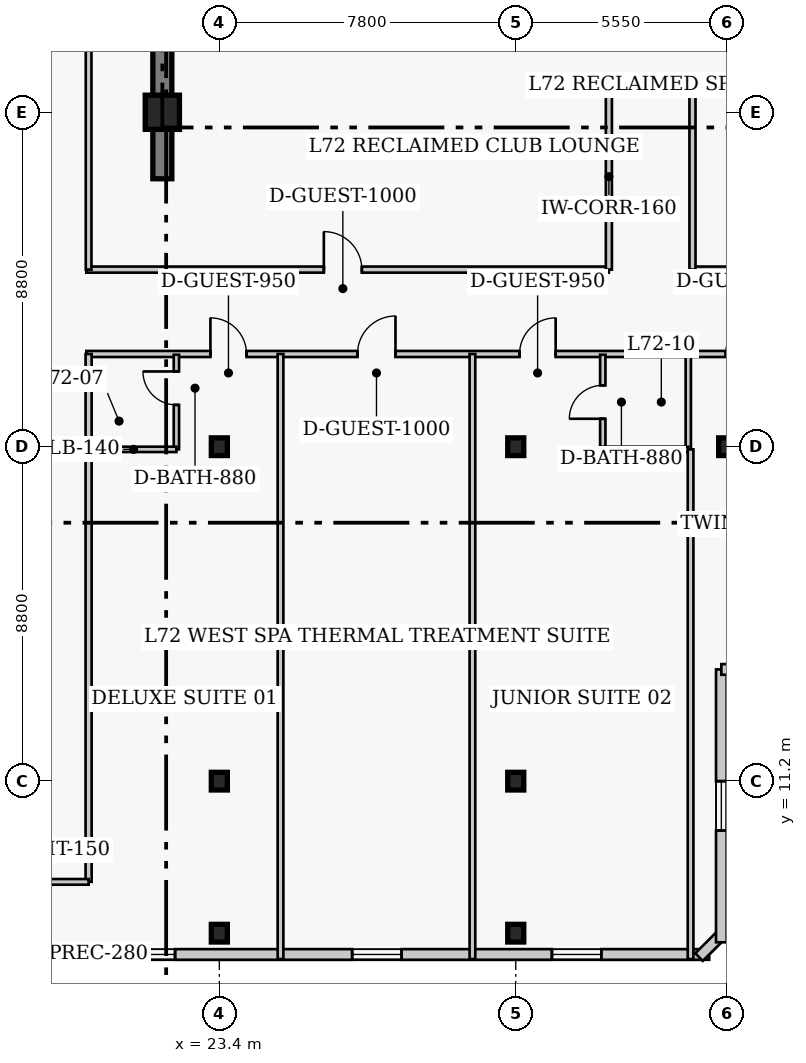
"""IFC4 building model, lengths in metres.
Left out: names, types, materials, properties, quantities, classifications, styles, units other than length and angle.
Written with IfcOpenShell. Run it as: python <this file> out.ifc"""

import sys

from ifc_helpers import new_model, si_unit, direction, frame, frame_2d, origin, origin_2d, place, context, subcontext, project, spatial, rectangle, i_section, extrude, element, fill, save


model = new_model("IFC4")
c1 = context("Model", 3, precision=1e-05, world=origin(), true_north=direction((0.0, 1.0)))
c2 = subcontext(c1, "Body", "Model", "MODEL_VIEW")
j1 = project(units=[si_unit("LENGTHUNIT", "METRE"), si_unit("PLANEANGLEUNIT", "RADIAN")], contexts=[c1])
p1 = place(None, origin())
s1 = spatial("IfcSite", under=j1, at=p1, CompositionType="ELEMENT")
p2 = place(p1, origin())
s2 = spatial("IfcBuilding", under=s1, at=p2, CompositionType="ELEMENT")
p3 = place(p2, frame((0.0, 0.0, 289.4)))
s3 = spatial("IfcBuildingStorey", under=s2, at=p3, CompositionType="ELEMENT", Elevation=289.4)
p4 = place(p3, frame((21.9, 27.05, 0.0), z_axis=(0.0, 0.0, 1.0), x_axis=(0.0, 1.0, 0.0)))
e1 = element("IfcWall", 1, at=p4, inside=s3, PredefinedType="SHEAR", context=c2, shape_type="SweptSolid", body=[
    extrude(rectangle(XDim=13.52, YDim=0.5, at=frame_2d((6.76, 0.0))), origin(), (0.0, 0.0, 1.0), 4.0),
])
for number, where, z_axis, x_axis in (
    (2, (23.4, 11.2, 0.0), (0.0, 0.0, 1.0), (1.0, 0.0, 0.0)),
    (3, (23.4, 20.0, 0.0), (0.0, 0.0, 1.0), (1.0, 0.0, 0.0)),
    (4, (31.2, 11.2, 0.0), (0.0, 0.0, 1.0), (1.0, 0.0, 0.0)),
    (5, (31.2, 20.0, 0.0), (0.0, 0.0, 1.0), (1.0, 0.0, 0.0)),
    (6, (36.75, 20.0, 0.0), (0.0, 0.0, 1.0), (1.0, 0.0, 0.0)),
):
    element("IfcColumn", number, at=place(p3, frame(where, z_axis=z_axis, x_axis=x_axis)), inside=s3, PredefinedType="COLUMN", context=c2, shape_type="SweptSolid", body=[
        extrude(i_section(OverallWidth=0.422, OverallDepth=0.465, WebThickness=0.045, FlangeThickness=0.073, FilletRadius=0.017, at=origin_2d()), origin(), (0.0, 0.0, 1.0), 4.0),
    ])
p5 = place(p3, frame((21.9, 28.8, 0.0), z_axis=(0.0, 0.0, 1.0), x_axis=(1.0, 0.0, 0.0)))
e7 = element("IfcColumn", 7, at=p5, inside=s3, PredefinedType="COLUMN", context=c2, shape_type="SweptSolid", body=[
    extrude(rectangle(XDim=0.9, YDim=0.9, at=origin_2d()), origin(), (0.0, 0.0, 1.0), 4.0),
])
for number, where, z_axis, x_axis in (
    (8, (23.4, 7.2, 0.0), (0.0, 0.0, 1.0), (1.0, 0.0, 0.0)),
    (9, (31.2, 7.2, 0.0), (0.0, 0.0, 1.0), (1.0, 0.0, 0.0)),
):
    element("IfcColumn", number, at=place(p3, frame(where, z_axis=z_axis, x_axis=x_axis)), inside=s3, PredefinedType="COLUMN", context=c2, shape_type="SweptSolid", body=[
        extrude(i_section(OverallWidth=0.422, OverallDepth=0.465, WebThickness=0.045, FlangeThickness=0.073, FilletRadius=0.017, at=origin_2d()), origin(), (0.0, 0.0, 1.0), 4.0),
    ])
p6 = place(p3, frame((11.46, 6.64, 0.0), z_axis=(0.0, 0.0, 1.0), x_axis=(1.0, 0.0, 0.0)))
e10 = element("IfcWall", 10, at=p6, inside=s3, PredefinedType="SOLIDWALL", context=c2, shape_type="SweptSolid", body=[
    extrude(rectangle(XDim=24.83, YDim=0.28, at=frame_2d((12.415, 0.0))), origin(), (0.0, 0.0, 1.0), 3.76),
])
p7 = place(p6, frame((3.488, 0.0, 0.85)))
e11 = element("IfcOpeningElement", 11, at=p7, cuts=e10, PredefinedType="OPENING", context=c2, shape_type="SweptSolid", body=[
    extrude(rectangle(XDim=1.3, YDim=1.7, at=frame_2d((0.65, 0.85))), frame((0.0, 0.15, 0.0), z_axis=(0.0, -1.0, 0.0), x_axis=(1.0, 0.0, 0.0)), (0.0, 0.0, 1.0), 0.3),
])
p8 = place(p6, frame((20.692, 0.0, 0.85)))
e12 = element("IfcOpeningElement", 12, at=p8, cuts=e10, PredefinedType="OPENING", context=c2, shape_type="SweptSolid", body=[
    extrude(rectangle(XDim=1.3, YDim=1.7, at=frame_2d((0.65, 0.85))), frame((0.0, 0.15, 0.0), z_axis=(0.0, -1.0, 0.0), x_axis=(1.0, 0.0, 0.0)), (0.0, 0.0, 1.0), 0.3),
])
p9 = place(p6, frame((9.475, 0.0, 0.85)))
e13 = element("IfcOpeningElement", 13, at=p9, cuts=e10, PredefinedType="OPENING", context=c2, shape_type="SweptSolid", body=[
    extrude(rectangle(XDim=1.3, YDim=1.7, at=frame_2d((0.65, 0.85))), frame((0.0, 0.15, 0.0), z_axis=(0.0, -1.0, 0.0), x_axis=(1.0, 0.0, 0.0)), (0.0, 0.0, 1.0), 0.3),
])
p10 = place(p6, frame((15.435, 0.0, 0.85)))
e14 = element("IfcOpeningElement", 14, at=p10, cuts=e10, PredefinedType="OPENING", context=c2, shape_type="SweptSolid", body=[
    extrude(rectangle(XDim=1.3, YDim=1.7, at=frame_2d((0.65, 0.85))), frame((0.0, 0.15, 0.0), z_axis=(0.0, -1.0, 0.0), x_axis=(1.0, 0.0, 0.0)), (0.0, 0.0, 1.0), 0.3),
])
p11 = place(p3, frame((36.023, 6.571, 0.0), z_axis=(0.0, 0.0, 1.0), x_axis=(0.707106781187, 0.707106781187, 0.0)))
e15 = element("IfcWall", 15, at=p11, inside=s3, PredefinedType="SOLIDWALL", context=c2, shape_type="SweptSolid", body=[
    extrude(rectangle(XDim=0.928, YDim=0.28, at=frame_2d((0.464, 0.0))), origin(), (0.0, 0.0, 1.0), 3.76),
])
p12 = place(p3, frame((36.61, 6.96, 0.0), z_axis=(0.0, 0.0, 1.0), x_axis=(0.0, 1.0, 0.0)))
e16 = element("IfcWall", 16, at=p12, inside=s3, PredefinedType="SOLIDWALL", context=c2, shape_type="SweptSolid", body=[
    extrude(rectangle(XDim=7.18, YDim=0.28, at=frame_2d((3.59, 0.0))), origin(), (0.0, 0.0, 1.0), 3.76),
])
p13 = place(p12, frame((2.94, 0.0, 0.85)))
e17 = element("IfcOpeningElement", 17, at=p13, cuts=e16, PredefinedType="OPENING", context=c2, shape_type="SweptSolid", body=[
    extrude(rectangle(XDim=1.3, YDim=1.7, at=frame_2d((0.65, 0.85))), frame((0.0, 0.15, 0.0), z_axis=(0.0, -1.0, 0.0), x_axis=(1.0, 0.0, 0.0)), (0.0, 0.0, 1.0), 0.3),
])
p14 = place(p3, frame((36.61, 14.14, 0.0), z_axis=(0.0, 0.0, 1.0), x_axis=(1.0, 0.0, 0.0)))
e18 = element("IfcWall", 18, at=p14, inside=s3, PredefinedType="SOLIDWALL", context=c2, shape_type="SweptSolid", body=[
    extrude(rectangle(XDim=4.78, YDim=0.28, at=frame_2d((2.39, 0.0))), origin(), (0.0, 0.0, 1.0), 3.76),
])
p15 = place(p14, frame((1.74, 0.0, 0.85)))
e19 = element("IfcOpeningElement", 19, at=p15, cuts=e18, PredefinedType="OPENING", context=c2, shape_type="SweptSolid", body=[
    extrude(rectangle(XDim=1.3, YDim=1.7, at=frame_2d((0.65, 0.85))), frame((0.0, 0.15, 0.0), z_axis=(0.0, -1.0, 0.0), x_axis=(1.0, 0.0, 0.0)), (0.0, 0.0, 1.0), 0.3),
])
p16 = place(p3, frame((19.9, 24.66, 0.0), z_axis=(0.0, 0.0, 1.0), x_axis=(1.0, 0.0, 0.0)))
e20 = element("IfcWall", 20, at=p16, inside=s3, PredefinedType="PARTITIONING", context=c2, shape_type="SweptSolid", body=[
    extrude(rectangle(XDim=13.75, YDim=0.16, at=frame_2d((6.875, 0.0))), origin(), (0.0, 0.0, 1.0), 3.76),
])
p17 = place(p16, frame((6.25, 0.0, 0.0)))
e21 = element("IfcOpeningElement", 21, at=p17, cuts=e20, PredefinedType="OPENING", context=c2, shape_type="SweptSolid", body=[
    extrude(rectangle(XDim=1.0, YDim=2.15, at=frame_2d((0.5, 1.075))), frame((0.0, 0.09, 0.0), z_axis=(0.0, -1.0, 0.0), x_axis=(1.0, 0.0, 0.0)), (0.0, 0.0, 1.0), 0.18),
])
p18 = place(p3, frame((35.85, 24.66, 0.0), z_axis=(0.0, 0.0, 1.0), x_axis=(1.0, 0.0, 0.0)))
e22 = element("IfcWall", 22, at=p18, inside=s3, PredefinedType="PARTITIONING", context=c2, shape_type="SweptSolid", body=[
    extrude(rectangle(XDim=22.8, YDim=0.16, at=frame_2d((11.4, 0.0))), origin(), (0.0, 0.0, 1.0), 3.76),
])
p19 = place(p18, frame((5.35, 0.0, 0.0)))
e23 = element("IfcOpeningElement", 23, at=p19, cuts=e22, PredefinedType="OPENING", context=c2, shape_type="SweptSolid", body=[
    extrude(rectangle(XDim=1.0, YDim=2.15, at=frame_2d((0.5, 1.075))), frame((0.0, 0.09, 0.0), z_axis=(0.0, -1.0, 0.0), x_axis=(1.0, 0.0, 0.0)), (0.0, 0.0, 1.0), 0.18),
])
p20 = place(p18, frame((12.85, 0.0, 0.0)))
e24 = element("IfcOpeningElement", 24, at=p20, cuts=e22, PredefinedType="OPENING", context=c2, shape_type="SweptSolid", body=[
    extrude(rectangle(XDim=1.0, YDim=2.15, at=frame_2d((0.5, 1.075))), frame((0.0, 0.09, 0.0), z_axis=(0.0, -1.0, 0.0), x_axis=(1.0, 0.0, 0.0)), (0.0, 0.0, 1.0), 0.18),
])
for number, where, z_axis, x_axis in (
    (25, (33.65, 24.66, 0.0), (0.0, 0.0, 1.0), (0.0, 1.0, 0.0)),
    (26, (35.85, 24.66, 0.0), (0.0, 0.0, 1.0), (0.0, 1.0, 0.0)),
):
    element("IfcWall", number, at=place(p3, frame(where, z_axis=z_axis, x_axis=x_axis)), inside=s3, PredefinedType="PARTITIONING", context=c2, shape_type="SweptSolid", body=[
        extrude(rectangle(XDim=4.89, YDim=0.16, at=frame_2d((2.445, 0.0))), origin(), (0.0, 0.0, 1.0), 3.76),
    ])
p21 = place(p3, frame((19.9, 22.44, 0.0), z_axis=(0.0, 0.0, 1.0), x_axis=(1.0, 0.0, 0.0)))
e27 = element("IfcWall", 27, at=p21, inside=s3, PredefinedType="PARTITIONING", context=c2, shape_type="SweptSolid", body=[
    extrude(rectangle(XDim=15.9, YDim=0.16, at=frame_2d((7.95, 0.0))), origin(), (0.0, 0.0, 1.0), 3.76),
])
p22 = place(p21, frame((3.265, 0.0, 0.0)))
e28 = element("IfcOpeningElement", 28, at=p22, cuts=e27, PredefinedType="OPENING", context=c2, shape_type="SweptSolid", body=[
    extrude(rectangle(XDim=0.95, YDim=2.1, at=frame_2d((0.475, 1.05))), frame((0.0, 0.09, 0.0), z_axis=(0.0, -1.0, 0.0), x_axis=(1.0, 0.0, 0.0)), (0.0, 0.0, 1.0), 0.18),
])
p23 = place(p21, frame((7.135, 0.0, 0.0)))
e29 = element("IfcOpeningElement", 29, at=p23, cuts=e27, PredefinedType="OPENING", context=c2, shape_type="SweptSolid", body=[
    extrude(rectangle(XDim=1.0, YDim=2.15, at=frame_2d((0.5, 1.075))), frame((0.0, 0.09, 0.0), z_axis=(0.0, -1.0, 0.0), x_axis=(1.0, 0.0, 0.0)), (0.0, 0.0, 1.0), 0.18),
])
p24 = place(p21, frame((11.4, 0.0, 0.0)))
e30 = element("IfcOpeningElement", 30, at=p24, cuts=e27, PredefinedType="OPENING", context=c2, shape_type="SweptSolid", body=[
    extrude(rectangle(XDim=0.95, YDim=2.1, at=frame_2d((0.475, 1.05))), frame((0.0, 0.09, 0.0), z_axis=(0.0, -1.0, 0.0), x_axis=(1.0, 0.0, 0.0)), (0.0, 0.0, 1.0), 0.18),
])
p25 = place(p3, frame((35.8, 22.44, 0.0), z_axis=(0.0, 0.0, 1.0), x_axis=(1.0, 0.0, 0.0)))
e31 = element("IfcWall", 31, at=p25, inside=s3, PredefinedType="PARTITIONING", context=c2, shape_type="SweptSolid", body=[
    extrude(rectangle(XDim=25.01, YDim=0.16, at=frame_2d((12.505, 0.0))), origin(), (0.0, 0.0, 1.0), 3.76),
])
p26 = place(p25, frame((0.924, 0.0, 0.0)))
e32 = element("IfcOpeningElement", 32, at=p26, cuts=e31, PredefinedType="OPENING", context=c2, shape_type="SweptSolid", body=[
    extrude(rectangle(XDim=0.95, YDim=2.1, at=frame_2d((0.475, 1.05))), frame((0.0, 0.09, 0.0), z_axis=(0.0, -1.0, 0.0), x_axis=(1.0, 0.0, 0.0)), (0.0, 0.0, 1.0), 0.18),
])
p27 = place(p25, frame((9.226, 0.0, 0.0)))
e33 = element("IfcOpeningElement", 33, at=p27, cuts=e31, PredefinedType="OPENING", context=c2, shape_type="SweptSolid", body=[
    extrude(rectangle(XDim=0.95, YDim=2.1, at=frame_2d((0.475, 1.05))), frame((0.0, 0.09, 0.0), z_axis=(0.0, -1.0, 0.0), x_axis=(1.0, 0.0, 0.0)), (0.0, 0.0, 1.0), 0.18),
])
p28 = place(p25, frame((12.614, 0.0, 0.0)))
e34 = element("IfcOpeningElement", 34, at=p28, cuts=e31, PredefinedType="OPENING", context=c2, shape_type="SweptSolid", body=[
    extrude(rectangle(XDim=0.95, YDim=2.1, at=frame_2d((0.475, 1.05))), frame((0.0, 0.09, 0.0), z_axis=(0.0, -1.0, 0.0), x_axis=(1.0, 0.0, 0.0)), (0.0, 0.0, 1.0), 0.18),
])
p29 = place(p25, frame((19.441, 0.0, 0.0)))
e35 = element("IfcOpeningElement", 35, at=p29, cuts=e31, PredefinedType="OPENING", context=c2, shape_type="SweptSolid", body=[
    extrude(rectangle(XDim=1.0, YDim=2.15, at=frame_2d((0.5, 1.075))), frame((0.0, 0.09, 0.0), z_axis=(0.0, -1.0, 0.0), x_axis=(1.0, 0.0, 0.0)), (0.0, 0.0, 1.0), 0.18),
])
p30 = place(p25, frame((23.465, 0.0, 0.0)))
e36 = element("IfcOpeningElement", 36, at=p30, cuts=e31, PredefinedType="OPENING", context=c2, shape_type="SweptSolid", body=[
    extrude(rectangle(XDim=0.95, YDim=2.1, at=frame_2d((0.475, 1.05))), frame((0.0, 0.09, 0.0), z_axis=(0.0, -1.0, 0.0), x_axis=(1.0, 0.0, 0.0)), (0.0, 0.0, 1.0), 0.18),
])
p31 = place(p3, frame((19.96, 8.55, 0.0), z_axis=(0.0, 0.0, 1.0), x_axis=(0.0, 1.0, 0.0)))
e37 = element("IfcWall", 37, at=p31, inside=s3, PredefinedType="PARTITIONING", context=c2, shape_type="SweptSolid", body=[
    extrude(rectangle(XDim=13.89, YDim=0.16, at=frame_2d((6.945, 0.0))), origin(), (0.0, 0.0, 1.0), 3.76),
])
p32 = place(p3, frame((17.74, 8.55, 0.0), z_axis=(0.0, 0.0, 1.0), x_axis=(1.0, 0.0, 0.0)))
e38 = element("IfcWall", 38, at=p32, inside=s3, PredefinedType="PARTITIONING", context=c2, shape_type="SweptSolid", body=[
    extrude(rectangle(XDim=2.22, YDim=0.15, at=frame_2d((1.11, 0.0))), origin(), (0.0, 0.0, 1.0), 3.76),
])
p33 = place(p3, frame((19.96, 24.66, 0.0), z_axis=(0.0, 0.0, 1.0), x_axis=(0.0, 1.0, 0.0)))
e39 = element("IfcWall", 39, at=p33, inside=s3, PredefinedType="PARTITIONING", context=c2, shape_type="SweptSolid", body=[
    extrude(rectangle(XDim=8.14, YDim=0.15, at=frame_2d((4.07, 0.0))), origin(), (0.0, 0.0, 1.0), 3.76),
])
p34 = place(p3, frame((22.27, 19.93, 0.0), z_axis=(0.0, 0.0, 1.0), x_axis=(0.0, 1.0, 0.0)))
e40 = element("IfcWall", 40, at=p34, inside=s3, PredefinedType="PLUMBINGWALL", context=c2, shape_type="SweptSolid", body=[
    extrude(rectangle(XDim=2.49, YDim=0.14, at=frame_2d((1.245, 0.0))), origin(), (0.0, 0.0, 1.0), 3.76),
])
p35 = place(p34, frame((1.17, 0.0, 0.0)))
e41 = element("IfcOpeningElement", 41, at=p35, cuts=e40, PredefinedType="OPENING", context=c2, shape_type="SweptSolid", body=[
    extrude(rectangle(XDim=0.88, YDim=2.05, at=frame_2d((0.44, 1.025))), frame((0.0, 0.08, 0.0), z_axis=(0.0, -1.0, 0.0), x_axis=(1.0, 0.0, 0.0)), (0.0, 0.0, 1.0), 0.16),
])
p36 = place(p3, frame((20.02, 19.93, 0.0), z_axis=(0.0, 0.0, 1.0), x_axis=(1.0, 0.0, 0.0)))
e42 = element("IfcWall", 42, at=p36, inside=s3, PredefinedType="PLUMBINGWALL", context=c2, shape_type="SweptSolid", body=[
    extrude(rectangle(XDim=2.25, YDim=0.14, at=frame_2d((1.125, 0.0))), origin(), (0.0, 0.0, 1.0), 3.064),
])
for number, where, z_axis, x_axis in (
    (43, (25.01, 6.52, 0.0), (0.0, 0.0, 1.0), (0.0, 1.0, 0.0)),
    (44, (30.06, 6.52, 0.0), (0.0, 0.0, 1.0), (0.0, 1.0, 0.0)),
):
    element("IfcWall", number, at=place(p3, frame(where, z_axis=z_axis, x_axis=x_axis)), inside=s3, PredefinedType="PARTITIONING", context=c2, shape_type="SweptSolid", body=[
        extrude(rectangle(XDim=15.92, YDim=0.15, at=frame_2d((7.96, 0.0))), origin(), (0.0, 0.0, 1.0), 3.76),
    ])
p37 = place(p3, frame((33.49, 19.93, 0.0), z_axis=(0.0, 0.0, 1.0), x_axis=(0.0, 1.0, 0.0)))
e45 = element("IfcWall", 45, at=p37, inside=s3, PredefinedType="PLUMBINGWALL", context=c2, shape_type="SweptSolid", body=[
    extrude(rectangle(XDim=2.49, YDim=0.14, at=frame_2d((1.245, 0.0))), origin(), (0.0, 0.0, 1.0), 3.76),
])
p38 = place(p37, frame((0.805, 0.0, 0.0)))
e46 = element("IfcOpeningElement", 46, at=p38, cuts=e45, PredefinedType="OPENING", context=c2, shape_type="SweptSolid", body=[
    extrude(rectangle(XDim=0.88, YDim=2.05, at=frame_2d((0.44, 1.025))), frame((0.0, 0.08, 0.0), z_axis=(0.0, -1.0, 0.0), x_axis=(1.0, 0.0, 0.0)), (0.0, 0.0, 1.0), 0.16),
])
p39 = place(p3, frame((35.74, 19.93, 0.0), z_axis=(0.0, 0.0, 1.0), x_axis=(0.0, 1.0, 0.0)))
e47 = element("IfcWall", 47, at=p39, inside=s3, PredefinedType="PLUMBINGWALL", context=c2, shape_type="SweptSolid", body=[
    extrude(rectangle(XDim=2.49, YDim=0.14, at=frame_2d((1.245, 0.0))), origin(), (0.0, 0.0, 1.0), 3.76),
])
p40 = place(p3, frame((33.49, 19.93, 0.0), z_axis=(0.0, 0.0, 1.0), x_axis=(1.0, 0.0, 0.0)))
e48 = element("IfcWall", 48, at=p40, inside=s3, PredefinedType="PLUMBINGWALL", context=c2, shape_type="SweptSolid", body=[
    extrude(rectangle(XDim=2.25, YDim=0.14, at=frame_2d((1.125, 0.0))), origin(), (0.0, 0.0, 1.0), 3.064),
])
p41 = place(p3, frame((35.8, 6.52, 0.0), z_axis=(0.0, 0.0, 1.0), x_axis=(0.0, 1.0, 0.0)))
e49 = element("IfcWall", 49, at=p41, inside=s3, PredefinedType="PARTITIONING", context=c2, shape_type="SweptSolid", body=[
    extrude(rectangle(XDim=13.41, YDim=0.15, at=frame_2d((6.705, 0.0))), origin(), (0.0, 0.0, 1.0), 3.76),
])
p42 = place(p8, origin())
e50 = element("IfcWindow", 50, at=p42, inside=s3, PartitioningType="SINGLE_PANEL", PredefinedType="WINDOW", context=c2, shape_type="SweptSolid", body=[
    extrude(rectangle(XDim=1.3, YDim=1.7, at=frame_2d((0.65, 0.85))), frame((0.0, 0.03, 0.0), z_axis=(0.0, -1.0, 0.0), x_axis=(1.0, 0.0, 0.0)), (0.0, 0.0, 1.0), 0.06),
])
fill(e12, e50)
p43 = place(p13, origin())
e51 = element("IfcWindow", 51, at=p43, inside=s3, PartitioningType="SINGLE_PANEL", PredefinedType="WINDOW", context=c2, shape_type="SweptSolid", body=[
    extrude(rectangle(XDim=1.3, YDim=1.7, at=frame_2d((0.65, 0.85))), frame((0.0, 0.03, 0.0), z_axis=(0.0, -1.0, 0.0), x_axis=(1.0, 0.0, 0.0)), (0.0, 0.0, 1.0), 0.06),
])
fill(e17, e51)
p44 = place(p9, origin())
e52 = element("IfcWindow", 52, at=p44, inside=s3, PartitioningType="SINGLE_PANEL", PredefinedType="WINDOW", context=c2, shape_type="SweptSolid", body=[
    extrude(rectangle(XDim=1.3, YDim=1.7, at=frame_2d((0.65, 0.85))), frame((0.0, 0.03, 0.0), z_axis=(0.0, -1.0, 0.0), x_axis=(1.0, 0.0, 0.0)), (0.0, 0.0, 1.0), 0.06),
])
fill(e13, e52)
p45 = place(p10, origin())
e53 = element("IfcWindow", 53, at=p45, inside=s3, PartitioningType="SINGLE_PANEL", PredefinedType="WINDOW", context=c2, shape_type="SweptSolid", body=[
    extrude(rectangle(XDim=1.3, YDim=1.7, at=frame_2d((0.65, 0.85))), frame((0.0, 0.03, 0.0), z_axis=(0.0, -1.0, 0.0), x_axis=(1.0, 0.0, 0.0)), (0.0, 0.0, 1.0), 0.06),
])
fill(e14, e53)
p46 = place(p17, origin())
e54 = element("IfcDoor", 54, at=p46, inside=s3, OperationType="SINGLE_SWING_LEFT", PredefinedType="DOOR", context=c2, shape_type="SweptSolid", body=[
    extrude(rectangle(XDim=1.0, YDim=2.15, at=frame_2d((0.5, 1.075))), frame((0.0, 0.025, 0.0), z_axis=(0.0, -1.0, 0.0), x_axis=(1.0, 0.0, 0.0)), (0.0, 0.0, 1.0), 0.05),
])
fill(e21, e54)
p47 = place(p35, origin())
e55 = element("IfcDoor", 55, at=p47, inside=s3, OperationType="SINGLE_SWING_RIGHT", PredefinedType="DOOR", context=c2, shape_type="SweptSolid", body=[
    extrude(rectangle(XDim=0.88, YDim=2.05, at=frame_2d((0.44, 1.025))), frame((0.0, 0.025, 0.0), z_axis=(0.0, -1.0, 0.0), x_axis=(1.0, 0.0, 0.0)), (0.0, 0.0, 1.0), 0.05),
])
fill(e41, e55)
p48 = place(p22, origin())
e56 = element("IfcDoor", 56, at=p48, inside=s3, OperationType="SINGLE_SWING_LEFT", PredefinedType="DOOR", context=c2, shape_type="SweptSolid", body=[
    extrude(rectangle(XDim=0.95, YDim=2.1, at=frame_2d((0.475, 1.05))), frame((0.0, 0.025, 0.0), z_axis=(0.0, -1.0, 0.0), x_axis=(1.0, 0.0, 0.0)), (0.0, 0.0, 1.0), 0.05),
])
fill(e28, e56)
p49 = place(p23, origin())
e57 = element("IfcDoor", 57, at=p49, inside=s3, OperationType="SINGLE_SWING_RIGHT", PredefinedType="DOOR", context=c2, shape_type="SweptSolid", body=[
    extrude(rectangle(XDim=1.0, YDim=2.15, at=frame_2d((0.5, 1.075))), frame((0.0, 0.025, 0.0), z_axis=(0.0, -1.0, 0.0), x_axis=(1.0, 0.0, 0.0)), (0.0, 0.0, 1.0), 0.05),
])
fill(e29, e57)
p50 = place(p38, origin())
e58 = element("IfcDoor", 58, at=p50, inside=s3, OperationType="SINGLE_SWING_LEFT", PredefinedType="DOOR", context=c2, shape_type="SweptSolid", body=[
    extrude(rectangle(XDim=0.88, YDim=2.05, at=frame_2d((0.44, 1.025))), frame((0.0, 0.025, 0.0), z_axis=(0.0, -1.0, 0.0), x_axis=(1.0, 0.0, 0.0)), (0.0, 0.0, 1.0), 0.05),
])
fill(e46, e58)
p51 = place(p24, origin())
e59 = element("IfcDoor", 59, at=p51, inside=s3, OperationType="SINGLE_SWING_RIGHT", PredefinedType="DOOR", context=c2, shape_type="SweptSolid", body=[
    extrude(rectangle(XDim=0.95, YDim=2.1, at=frame_2d((0.475, 1.05))), frame((0.0, 0.025, 0.0), z_axis=(0.0, -1.0, 0.0), x_axis=(1.0, 0.0, 0.0)), (0.0, 0.0, 1.0), 0.05),
])
fill(e30, e59)
p52 = place(p26, origin())
e60 = element("IfcDoor", 60, at=p52, inside=s3, OperationType="SINGLE_SWING_RIGHT", PredefinedType="DOOR", context=c2, shape_type="SweptSolid", body=[
    extrude(rectangle(XDim=0.95, YDim=2.1, at=frame_2d((0.475, 1.05))), frame((0.0, 0.025, 0.0), z_axis=(0.0, -1.0, 0.0), x_axis=(1.0, 0.0, 0.0)), (0.0, 0.0, 1.0), 0.05),
])
fill(e32, e60)
save(model, sys.argv[1])
